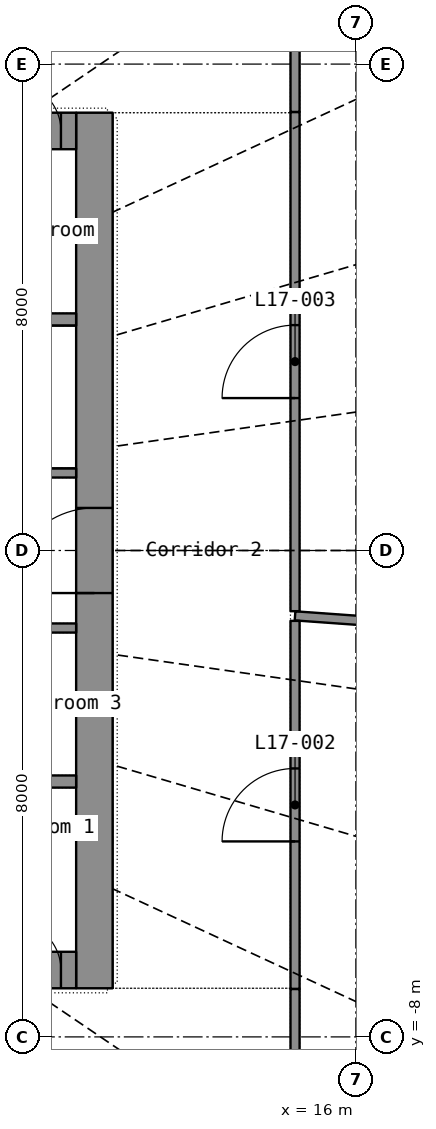
"""IFC4 building model, lengths in metres.
Left out: names, types, materials, properties, quantities, classifications, styles, units other than length and angle.
Written with IfcOpenShell. Run it as: python <this file> out.ifc"""

import sys

from ifc_helpers import new_model, si_unit, direction, frame, frame_2d, origin, place, context, subcontext, project, spatial, rectangle, extrude, element, fill, save


model = new_model("IFC4")
c1 = context("Model", 3, precision=1e-05, world=origin(), true_north=direction((0.0, 1.0)))
c2 = subcontext(c1, "Body", "Model", "MODEL_VIEW")
j1 = project(units=[si_unit("LENGTHUNIT", "METRE"), si_unit("PLANEANGLEUNIT", "RADIAN")], contexts=[c1])
p1 = place(None, origin())
s1 = spatial("IfcSite", under=j1, at=p1, CompositionType="ELEMENT")
p2 = place(p1, origin())
s2 = spatial("IfcBuilding", under=s1, at=p2, CompositionType="ELEMENT")
p3 = place(p2, frame((0.0, 0.0, 74.1)))
s3 = spatial("IfcBuildingStorey", under=s2, at=p3, CompositionType="ELEMENT", Elevation=74.1)
p4 = place(p3, frame((11.7, -7.2, 0.0), z_axis=(0.0, 0.0, 1.0), x_axis=(0.0, 1.0, 0.0)))
e1 = element("IfcWall", 1, at=p4, inside=s3, PredefinedType="SHEAR", context=c2, shape_type="SweptSolid", body=[
    extrude(rectangle(XDim=14.4, YDim=0.6, at=frame_2d((7.2, 0.0))), origin(), (0.0, 0.0, 1.0), 3.3),
])
p5 = place(p4, frame((6.5, 0.0, 0.0)))
e2 = element("IfcOpeningElement", 2, at=p5, cuts=e1, PredefinedType="OPENING", context=c2, shape_type="SweptSolid", body=[
    extrude(rectangle(XDim=1.4, YDim=2.2, at=frame_2d((0.7, 1.1))), frame((0.0, 0.31, 0.0), z_axis=(0.0, -1.0, 0.0), x_axis=(1.0, 0.0, 0.0)), (0.0, 0.0, 1.0), 0.62),
])
p6 = place(p3, frame((-11.4, -6.9, 0.0), z_axis=(0.0, 0.0, 1.0), x_axis=(1.0, 0.0, 0.0)))
e3 = element("IfcWall", 3, at=p6, inside=s3, PredefinedType="SHEAR", context=c2, shape_type="SweptSolid", body=[
    extrude(rectangle(XDim=22.8, YDim=0.6, at=frame_2d((11.4, 0.0))), origin(), (0.0, 0.0, 1.0), 3.3),
])
p7 = place(p6, frame((1.85, 0.0, 0.0)))
e4 = element("IfcOpeningElement", 4, at=p7, cuts=e3, PredefinedType="OPENING", context=c2, shape_type="SweptSolid", body=[
    extrude(rectangle(XDim=1.1, YDim=2.2, at=frame_2d((0.55, 1.1))), frame((0.0, 0.31, 0.0), z_axis=(0.0, -1.0, 0.0), x_axis=(1.0, 0.0, 0.0)), (0.0, 0.0, 1.0), 0.62),
])
p8 = place(p6, frame((3.85, 0.0, 0.0)))
e5 = element("IfcOpeningElement", 5, at=p8, cuts=e3, PredefinedType="OPENING", context=c2, shape_type="SweptSolid", body=[
    extrude(rectangle(XDim=1.1, YDim=2.2, at=frame_2d((0.55, 1.1))), frame((0.0, 0.31, 0.0), z_axis=(0.0, -1.0, 0.0), x_axis=(1.0, 0.0, 0.0)), (0.0, 0.0, 1.0), 0.62),
])
p9 = place(p6, frame((5.85, 0.0, 0.0)))
e6 = element("IfcOpeningElement", 6, at=p9, cuts=e3, PredefinedType="OPENING", context=c2, shape_type="SweptSolid", body=[
    extrude(rectangle(XDim=1.1, YDim=2.2, at=frame_2d((0.55, 1.1))), frame((0.0, 0.31, 0.0), z_axis=(0.0, -1.0, 0.0), x_axis=(1.0, 0.0, 0.0)), (0.0, 0.0, 1.0), 0.62),
])
p10 = place(p6, frame((7.85, 0.0, 0.0)))
e7 = element("IfcOpeningElement", 7, at=p10, cuts=e3, PredefinedType="OPENING", context=c2, shape_type="SweptSolid", body=[
    extrude(rectangle(XDim=1.1, YDim=2.2, at=frame_2d((0.55, 1.1))), frame((0.0, 0.31, 0.0), z_axis=(0.0, -1.0, 0.0), x_axis=(1.0, 0.0, 0.0)), (0.0, 0.0, 1.0), 0.62),
])
p11 = place(p6, frame((9.85, 0.0, 0.0)))
e8 = element("IfcOpeningElement", 8, at=p11, cuts=e3, PredefinedType="OPENING", context=c2, shape_type="SweptSolid", body=[
    extrude(rectangle(XDim=1.1, YDim=2.2, at=frame_2d((0.55, 1.1))), frame((0.0, 0.31, 0.0), z_axis=(0.0, -1.0, 0.0), x_axis=(1.0, 0.0, 0.0)), (0.0, 0.0, 1.0), 0.62),
])
p12 = place(p6, frame((11.85, 0.0, 0.0)))
e9 = element("IfcOpeningElement", 9, at=p12, cuts=e3, PredefinedType="OPENING", context=c2, shape_type="SweptSolid", body=[
    extrude(rectangle(XDim=1.1, YDim=2.2, at=frame_2d((0.55, 1.1))), frame((0.0, 0.31, 0.0), z_axis=(0.0, -1.0, 0.0), x_axis=(1.0, 0.0, 0.0)), (0.0, 0.0, 1.0), 0.62),
])
p13 = place(p6, frame((13.85, 0.0, 0.0)))
e10 = element("IfcOpeningElement", 10, at=p13, cuts=e3, PredefinedType="OPENING", context=c2, shape_type="SweptSolid", body=[
    extrude(rectangle(XDim=1.1, YDim=2.2, at=frame_2d((0.55, 1.1))), frame((0.0, 0.31, 0.0), z_axis=(0.0, -1.0, 0.0), x_axis=(1.0, 0.0, 0.0)), (0.0, 0.0, 1.0), 0.62),
])
p14 = place(p6, frame((15.85, 0.0, 0.0)))
e11 = element("IfcOpeningElement", 11, at=p14, cuts=e3, PredefinedType="OPENING", context=c2, shape_type="SweptSolid", body=[
    extrude(rectangle(XDim=1.1, YDim=2.2, at=frame_2d((0.55, 1.1))), frame((0.0, 0.31, 0.0), z_axis=(0.0, -1.0, 0.0), x_axis=(1.0, 0.0, 0.0)), (0.0, 0.0, 1.0), 0.62),
])
p15 = place(p6, frame((19.85, 0.0, 0.0)))
e12 = element("IfcOpeningElement", 12, at=p15, cuts=e3, PredefinedType="OPENING", context=c2, shape_type="SweptSolid", body=[
    extrude(rectangle(XDim=1.1, YDim=2.2, at=frame_2d((0.55, 1.1))), frame((0.0, 0.31, 0.0), z_axis=(0.0, -1.0, 0.0), x_axis=(1.0, 0.0, 0.0)), (0.0, 0.0, 1.0), 0.62),
])
p16 = place(p6, frame((0.25, 0.0, 0.0)))
e13 = element("IfcOpeningElement", 13, at=p16, cuts=e3, PredefinedType="OPENING", context=c2, shape_type="SweptSolid", body=[
    extrude(rectangle(XDim=0.8, YDim=2.05, at=frame_2d((0.4, 1.025))), frame((0.0, 0.31, 0.0), z_axis=(0.0, -1.0, 0.0), x_axis=(1.0, 0.0, 0.0)), (0.0, 0.0, 1.0), 0.62),
])
p17 = place(p6, frame((21.75, 0.0, 0.0)))
e14 = element("IfcOpeningElement", 14, at=p17, cuts=e3, PredefinedType="OPENING", context=c2, shape_type="SweptSolid", body=[
    extrude(rectangle(XDim=0.8, YDim=2.05, at=frame_2d((0.4, 1.025))), frame((0.0, 0.31, 0.0), z_axis=(0.0, -1.0, 0.0), x_axis=(1.0, 0.0, 0.0)), (0.0, 0.0, 1.0), 0.62),
])
p18 = place(p3, frame((-11.4, 6.9, 0.0), z_axis=(0.0, 0.0, 1.0), x_axis=(1.0, 0.0, 0.0)))
e15 = element("IfcWall", 15, at=p18, inside=s3, PredefinedType="SHEAR", context=c2, shape_type="SweptSolid", body=[
    extrude(rectangle(XDim=22.8, YDim=0.6, at=frame_2d((11.4, 0.0))), origin(), (0.0, 0.0, 1.0), 3.3),
])
p19 = place(p18, frame((1.85, 0.0, 0.0)))
e16 = element("IfcOpeningElement", 16, at=p19, cuts=e15, PredefinedType="OPENING", context=c2, shape_type="SweptSolid", body=[
    extrude(rectangle(XDim=1.1, YDim=2.2, at=frame_2d((0.55, 1.1))), frame((0.0, 0.31, 0.0), z_axis=(0.0, -1.0, 0.0), x_axis=(1.0, 0.0, 0.0)), (0.0, 0.0, 1.0), 0.62),
])
p20 = place(p18, frame((7.95, 0.0, 0.0)))
e17 = element("IfcOpeningElement", 17, at=p20, cuts=e15, PredefinedType="OPENING", context=c2, shape_type="SweptSolid", body=[
    extrude(rectangle(XDim=0.9, YDim=2.1, at=frame_2d((0.45, 1.05))), frame((0.0, 0.31, 0.0), z_axis=(0.0, -1.0, 0.0), x_axis=(1.0, 0.0, 0.0)), (0.0, 0.0, 1.0), 0.62),
])
p21 = place(p18, frame((13.95, 0.0, 0.0)))
e18 = element("IfcOpeningElement", 18, at=p21, cuts=e15, PredefinedType="OPENING", context=c2, shape_type="SweptSolid", body=[
    extrude(rectangle(XDim=0.9, YDim=2.1, at=frame_2d((0.45, 1.05))), frame((0.0, 0.31, 0.0), z_axis=(0.0, -1.0, 0.0), x_axis=(1.0, 0.0, 0.0)), (0.0, 0.0, 1.0), 0.62),
])
p22 = place(p18, frame((18.95, 0.0, 0.0)))
e19 = element("IfcOpeningElement", 19, at=p22, cuts=e15, PredefinedType="OPENING", context=c2, shape_type="SweptSolid", body=[
    extrude(rectangle(XDim=0.9, YDim=2.1, at=frame_2d((0.45, 1.05))), frame((0.0, 0.31, 0.0), z_axis=(0.0, -1.0, 0.0), x_axis=(1.0, 0.0, 0.0)), (0.0, 0.0, 1.0), 0.62),
])
p23 = place(p18, frame((0.25, 0.0, 0.0)))
e20 = element("IfcOpeningElement", 20, at=p23, cuts=e15, PredefinedType="OPENING", context=c2, shape_type="SweptSolid", body=[
    extrude(rectangle(XDim=0.8, YDim=2.05, at=frame_2d((0.4, 1.025))), frame((0.0, 0.31, 0.0), z_axis=(0.0, -1.0, 0.0), x_axis=(1.0, 0.0, 0.0)), (0.0, 0.0, 1.0), 0.62),
])
p24 = place(p18, frame((21.75, 0.0, 0.0)))
e21 = element("IfcOpeningElement", 21, at=p24, cuts=e15, PredefinedType="OPENING", context=c2, shape_type="SweptSolid", body=[
    extrude(rectangle(XDim=0.8, YDim=2.05, at=frame_2d((0.4, 1.025))), frame((0.0, 0.31, 0.0), z_axis=(0.0, -1.0, 0.0), x_axis=(1.0, 0.0, 0.0)), (0.0, 0.0, 1.0), 0.62),
])
for number, where, z_axis, x_axis in (
    (22, (-11.4, -3.8, 0.0), (0.0, 0.0, 1.0), (1.0, 0.0, 0.0)),
    (23, (-11.4, 3.8, 0.0), (0.0, 0.0, 1.0), (1.0, 0.0, 0.0)),
):
    element("IfcWall", number, at=place(p3, frame(where, z_axis=z_axis, x_axis=x_axis)), inside=s3, PredefinedType="SHEAR", context=c2, shape_type="SweptSolid", body=[
        extrude(rectangle(XDim=22.8, YDim=0.2, at=frame_2d((11.4, 0.0))), origin(), (0.0, 0.0, 1.0), 3.3),
    ])
p25 = place(p3, frame((3.0, -1.275, 0.0), z_axis=(0.0, 0.0, 1.0), x_axis=(1.0, 0.0, 0.0)))
e24 = element("IfcWall", 24, at=p25, inside=s3, PredefinedType="PARTITIONING", context=c2, shape_type="SweptSolid", body=[
    extrude(rectangle(XDim=8.4, YDim=0.15, at=frame_2d((4.2, 0.0))), origin(), (0.0, 0.0, 1.0), 3.3),
])
p26 = place(p25, frame((0.688, 0.0, 0.0)))
e25 = element("IfcOpeningElement", 25, at=p26, cuts=e24, PredefinedType="OPENING", context=c2, shape_type="SweptSolid", body=[
    extrude(rectangle(XDim=0.85, YDim=2.1, at=frame_2d((0.425, 1.05))), frame((0.0, 0.085, 0.0), z_axis=(0.0, -1.0, 0.0), x_axis=(1.0, 0.0, 0.0)), (0.0, 0.0, 1.0), 0.17),
])
p27 = place(p25, frame((3.144, 0.0, 0.0)))
e26 = element("IfcOpeningElement", 26, at=p27, cuts=e24, PredefinedType="OPENING", context=c2, shape_type="SweptSolid", body=[
    extrude(rectangle(XDim=0.85, YDim=2.1, at=frame_2d((0.425, 1.05))), frame((0.0, 0.085, 0.0), z_axis=(0.0, -1.0, 0.0), x_axis=(1.0, 0.0, 0.0)), (0.0, 0.0, 1.0), 0.17),
])
p28 = place(p25, frame((5.256, 0.0, 0.0)))
e27 = element("IfcOpeningElement", 27, at=p28, cuts=e24, PredefinedType="OPENING", context=c2, shape_type="SweptSolid", body=[
    extrude(rectangle(XDim=0.9, YDim=2.1, at=frame_2d((0.45, 1.05))), frame((0.0, 0.085, 0.0), z_axis=(0.0, -1.0, 0.0), x_axis=(1.0, 0.0, 0.0)), (0.0, 0.0, 1.0), 0.17),
])
p29 = place(p25, frame((7.075, 0.0, 0.0)))
e28 = element("IfcOpeningElement", 28, at=p29, cuts=e24, PredefinedType="OPENING", context=c2, shape_type="SweptSolid", body=[
    extrude(rectangle(XDim=0.9, YDim=2.1, at=frame_2d((0.45, 1.05))), frame((0.0, 0.085, 0.0), z_axis=(0.0, -1.0, 0.0), x_axis=(1.0, 0.0, 0.0)), (0.0, 0.0, 1.0), 0.17),
])
p30 = place(p3, frame((3.0, 1.275, 0.0), z_axis=(0.0, 0.0, 1.0), x_axis=(1.0, 0.0, 0.0)))
e29 = element("IfcWall", 29, at=p30, inside=s3, PredefinedType="SHEAR", context=c2, shape_type="SweptSolid", body=[
    extrude(rectangle(XDim=8.4, YDim=0.15, at=frame_2d((4.2, 0.0))), origin(), (0.0, 0.0, 1.0), 3.3),
])
p31 = place(p30, frame((2.05, 0.0, 0.0)))
e30 = element("IfcOpeningElement", 30, at=p31, cuts=e29, PredefinedType="OPENING", context=c2, shape_type="SweptSolid", body=[
    extrude(rectangle(XDim=1.1, YDim=2.15, at=frame_2d((0.55, 1.075))), frame((0.0, 0.085, 0.0), z_axis=(0.0, -1.0, 0.0), x_axis=(1.0, 0.0, 0.0)), (0.0, 0.0, 1.0), 0.17),
])
p32 = place(p30, frame((0.45, 0.0, 0.0)))
e31 = element("IfcOpeningElement", 31, at=p32, cuts=e29, PredefinedType="OPENING", context=c2, shape_type="SweptSolid", body=[
    extrude(rectangle(XDim=0.9, YDim=2.1, at=frame_2d((0.45, 1.05))), frame((0.0, 0.085, 0.0), z_axis=(0.0, -1.0, 0.0), x_axis=(1.0, 0.0, 0.0)), (0.0, 0.0, 1.0), 0.17),
])
p33 = place(p3, frame((26.692, -1.913, 0.0), z_axis=(0.0, 0.0, 1.0), x_axis=(-0.997441861, 0.071482396, 0.0)))
e32 = element("IfcWall", 32, at=p33, inside=s3, PredefinedType="PARTITIONING", context=c2, shape_type="SweptSolid", body=[
    extrude(rectangle(XDim=11.722, YDim=0.15, at=frame_2d((5.861, 0.0))), origin(), (0.0, 0.0, 1.0), 2.4),
])
p34 = place(p3, frame((15.0, -0.998, 0.0), z_axis=(0.0, 0.0, 1.0), x_axis=(0.0, 1.0, 0.0)))
e33 = element("IfcWall", 33, at=p34, inside=s3, PredefinedType="PARTITIONING", context=c2, shape_type="SweptSolid", body=[
    extrude(rectangle(XDim=8.21, YDim=0.15, at=frame_2d((4.105, 0.0))), origin(), (0.0, 0.0, 1.0), 2.4),
])
p35 = place(p34, frame((3.505, 0.0, 0.0)))
e34 = element("IfcOpeningElement", 34, at=p35, cuts=e33, PredefinedType="OPENING", context=c2, shape_type="SweptSolid", body=[
    extrude(rectangle(XDim=1.2, YDim=2.2, at=frame_2d((0.6, 1.1))), frame((0.0, 0.085, 0.0), z_axis=(0.0, -1.0, 0.0), x_axis=(1.0, 0.0, 0.0)), (0.0, 0.0, 1.0), 0.17),
])
p36 = place(p3, frame((15.0, -7.212, 0.0), z_axis=(0.0, 0.0, 1.0), x_axis=(0.0, 1.0, 0.0)))
e35 = element("IfcWall", 35, at=p36, inside=s3, PredefinedType="PARTITIONING", context=c2, shape_type="SweptSolid", body=[
    extrude(rectangle(XDim=6.054, YDim=0.15, at=frame_2d((3.027, 0.0))), origin(), (0.0, 0.0, 1.0), 2.4),
])
p37 = place(p36, frame((2.427, 0.0, 0.0)))
e36 = element("IfcOpeningElement", 36, at=p37, cuts=e35, PredefinedType="OPENING", context=c2, shape_type="SweptSolid", body=[
    extrude(rectangle(XDim=1.2, YDim=2.2, at=frame_2d((0.6, 1.1))), frame((0.0, 0.085, 0.0), z_axis=(0.0, -1.0, 0.0), x_axis=(1.0, 0.0, 0.0)), (0.0, 0.0, 1.0), 0.17),
])
p38 = place(p3, frame((15.0, -10.723, 0.0), z_axis=(0.0, 0.0, 1.0), x_axis=(0.0, 1.0, 0.0)))
e37 = element("IfcWall", 37, at=p38, inside=s3, PredefinedType="PARTITIONING", context=c2, shape_type="SweptSolid", body=[
    extrude(rectangle(XDim=3.51, YDim=0.15, at=frame_2d((1.755, 0.0))), origin(), (0.0, 0.0, 1.0), 2.4),
])
p39 = place(p3, frame((15.0, 7.213, 0.0), z_axis=(0.0, 0.0, 1.0), x_axis=(0.0, 1.0, 0.0)))
e38 = element("IfcWall", 38, at=p39, inside=s3, PredefinedType="PARTITIONING", context=c2, shape_type="SweptSolid", body=[
    extrude(rectangle(XDim=2.31, YDim=0.15, at=frame_2d((1.155, 0.0))), origin(), (0.0, 0.0, 1.0), 2.4),
])
p40 = place(p17, origin())
e39 = element("IfcDoor", 39, at=p40, inside=s3, OperationType="SINGLE_SWING_LEFT", PredefinedType="DOOR", context=c2, shape_type="SweptSolid", body=[
    extrude(rectangle(XDim=0.8, YDim=2.05, at=frame_2d((0.4, 1.025))), frame((0.0, 0.025, 0.0), z_axis=(0.0, -1.0, 0.0), x_axis=(1.0, 0.0, 0.0)), (0.0, 0.0, 1.0), 0.05),
])
fill(e14, e39)
p41 = place(p24, origin())
e40 = element("IfcDoor", 40, at=p41, inside=s3, OperationType="SINGLE_SWING_LEFT", PredefinedType="DOOR", context=c2, shape_type="SweptSolid", body=[
    extrude(rectangle(XDim=0.8, YDim=2.05, at=frame_2d((0.4, 1.025))), frame((0.0, 0.025, 0.0), z_axis=(0.0, -1.0, 0.0), x_axis=(1.0, 0.0, 0.0)), (0.0, 0.0, 1.0), 0.05),
])
fill(e21, e40)
p42 = place(p5, origin())
e41 = element("IfcDoor", 41, at=p42, inside=s3, OperationType="DOUBLE_DOOR_SINGLE_SWING", PredefinedType="DOOR", context=c2, shape_type="SweptSolid", body=[
    extrude(rectangle(XDim=1.4, YDim=2.2, at=frame_2d((0.7, 1.1))), frame((0.0, 0.025, 0.0), z_axis=(0.0, -1.0, 0.0), x_axis=(1.0, 0.0, 0.0)), (0.0, 0.0, 1.0), 0.05),
])
fill(e2, e41)
p43 = place(p37, origin())
e42 = element("IfcDoor", 42, at=p43, inside=s3, OperationType="DOUBLE_DOOR_SINGLE_SWING", PredefinedType="DOOR", context=c2, shape_type="SweptSolid", body=[
    extrude(rectangle(XDim=1.2, YDim=2.2, at=frame_2d((0.6, 1.1))), frame((0.0, 0.025, 0.0), z_axis=(0.0, -1.0, 0.0), x_axis=(1.0, 0.0, 0.0)), (0.0, 0.0, 1.0), 0.05),
])
fill(e36, e42)
p44 = place(p35, origin())
e43 = element("IfcDoor", 43, at=p44, inside=s3, OperationType="DOUBLE_DOOR_SINGLE_SWING", PredefinedType="DOOR", context=c2, shape_type="SweptSolid", body=[
    extrude(rectangle(XDim=1.2, YDim=2.2, at=frame_2d((0.6, 1.1))), frame((0.0, 0.025, 0.0), z_axis=(0.0, -1.0, 0.0), x_axis=(1.0, 0.0, 0.0)), (0.0, 0.0, 1.0), 0.05),
])
fill(e34, e43)
save(model, sys.argv[1])
